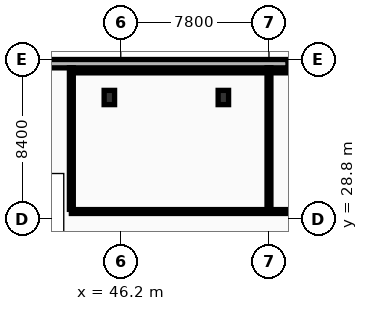
"""IFC4 building model, lengths in metres.
Left out: names, types, materials, properties, quantities, classifications, styles, units other than length and angle.
Written with IfcOpenShell. Run it as: python <this file> out.ifc"""

import sys

from ifc_helpers import new_model, si_unit, direction, frame, frame_2d, origin, origin_2d, place, context, subcontext, project, spatial, rectangle, extrude, element, fill, save


model = new_model("IFC4")
c1 = context("Model", 3, precision=1e-05, world=origin(), true_north=direction((0.0, 1.0)))
c2 = subcontext(c1, "Body", "Model", "MODEL_VIEW")
j1 = project(units=[si_unit("LENGTHUNIT", "METRE"), si_unit("PLANEANGLEUNIT", "RADIAN")], contexts=[c1])
p1 = place(None, origin())
s1 = spatial("IfcSite", under=j1, at=p1, CompositionType="ELEMENT")
p2 = place(p1, origin())
s2 = spatial("IfcBuilding", under=s1, at=p2, CompositionType="ELEMENT")
p3 = place(p2, frame((0.0, 0.0, 5.4)))
s3 = spatial("IfcBuildingStorey", under=s2, at=p3, CompositionType="ELEMENT", Elevation=5.4)
for number, where, z_axis, x_axis in (
    (1, (45.6, 35.2, 0.0), (0.0, 0.0, 1.0), (1.0, 0.0, 0.0)),
    (2, (51.6, 35.2, 0.0), (0.0, 0.0, 1.0), (1.0, 0.0, 0.0)),
):
    element("IfcColumn", number, at=place(p3, frame(where, z_axis=z_axis, x_axis=x_axis)), inside=s3, PredefinedType="COLUMN", context=c2, shape_type="SweptSolid", body=[
        extrude(rectangle(XDim=0.55, YDim=0.75, at=origin_2d()), origin(), (0.0, 0.0, 1.0), 4.5),
    ])
p4 = place(p3, frame((38.45, 36.98, 0.0), z_axis=(0.0, 0.0, 1.0), x_axis=(1.0, 0.0, 0.0)))
e3 = element("IfcWall", 3, at=p4, inside=s3, PredefinedType="STANDARD", context=c2, shape_type="SweptSolid", body=[
    extrude(rectangle(XDim=16.55, YDim=0.44, at=frame_2d((8.275, 0.0))), origin(), (0.0, 0.0, 1.0), 3.38),
])
for number, where, z_axis, x_axis in (
    (4, (43.6, 36.6, 0.0), (0.0, 0.0, 1.0), (1.0, 0.0, 0.0)),
    (5, (54.89, 29.2, 0.0), (0.0, 0.0, 1.0), (-1.0, 0.0, 0.0)),
):
    element("IfcWall", number, at=place(p3, frame(where, z_axis=z_axis, x_axis=x_axis)), inside=s3, PredefinedType="STANDARD", context=c2, shape_type="SweptSolid", body=[
        extrude(rectangle(XDim=11.29, YDim=0.205, at=frame_2d((5.645, 0.0))), origin(), (0.0, 0.0, 1.0), 4.225),
    ])
p5 = place(p3, frame((43.6, 29.312, 0.0), z_axis=(0.0, 0.0, 1.0), x_axis=(0.0, 1.0, 0.0)))
e6 = element("IfcWall", 6, at=p5, inside=s3, PredefinedType="STANDARD", context=c2, shape_type="SweptSolid", body=[
    extrude(rectangle(XDim=7.454, YDim=0.205, at=frame_2d((3.727, 0.0))), origin(), (0.0, 0.0, 1.0), 3.57),
])
p6 = place(p5, frame((1.956, 0.0, 0.0)))
e7 = element("IfcOpeningElement", 7, at=p6, cuts=e6, PredefinedType="OPENING", context=c2, shape_type="SweptSolid", body=[
    extrude(rectangle(XDim=1.4, YDim=2.25, at=frame_2d((0.7, 1.125))), frame((0.0, 0.113, 0.0), z_axis=(0.0, -1.0, 0.0), x_axis=(1.0, 0.0, 0.0)), (0.0, 0.0, 1.0), 0.225),
])
p7 = place(p3, frame((54.0, 36.766, 0.0), z_axis=(0.0, 0.0, 1.0), x_axis=(0.0, -1.0, 0.0)))
e8 = element("IfcWall", 8, at=p7, inside=s3, PredefinedType="STANDARD", context=c2, shape_type="SweptSolid", body=[
    extrude(rectangle(XDim=7.454, YDim=0.205, at=frame_2d((3.727, 0.0))), origin(), (0.0, 0.0, 1.0), 4.225),
])
p8 = place(p6, origin())
e9 = element("IfcDoor", 9, at=p8, inside=s3, OperationType="SINGLE_SWING_LEFT", PredefinedType="DOOR", context=c2, shape_type="SweptSolid", body=[
    extrude(rectangle(XDim=1.4, YDim=2.25, at=frame_2d((0.7, 1.125))), frame((0.0, 0.025, 0.0), z_axis=(0.0, -1.0, 0.0), x_axis=(1.0, 0.0, 0.0)), (0.0, 0.0, 1.0), 0.05),
])
fill(e7, e9)
save(model, sys.argv[1])
